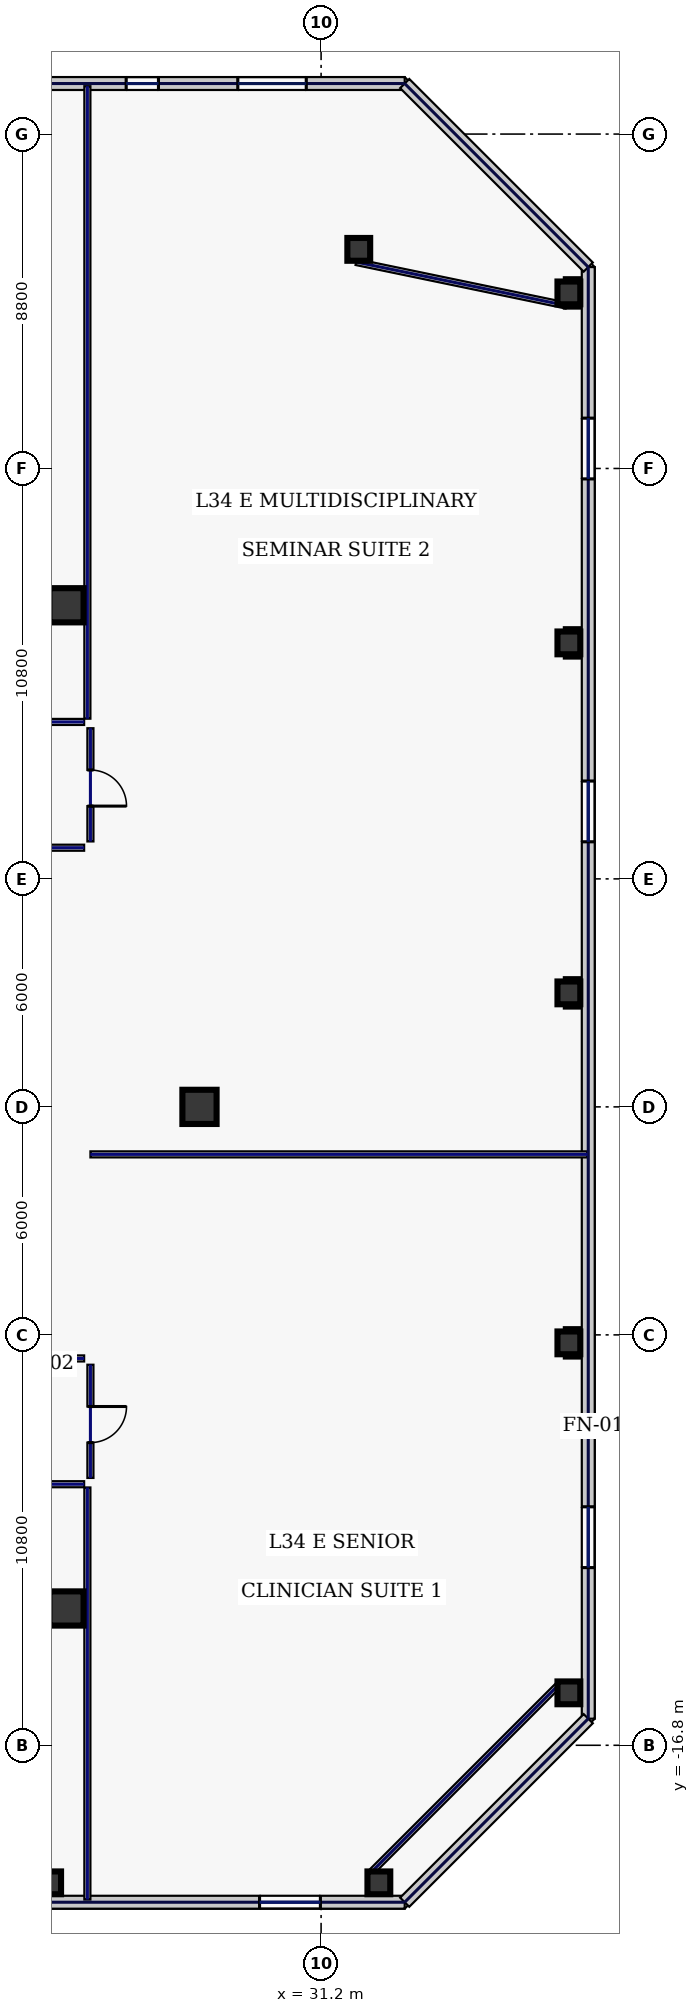
"""IFC4 building model, lengths in metres.
Left out: names, types, materials, properties, quantities, classifications, styles, units other than length and angle.
Written with IfcOpenShell. Run it as: python <this file> out.ifc"""

import sys

from ifc_helpers import new_model, si_unit, direction, frame, frame_2d, origin, origin_2d, place, context, subcontext, project, spatial, rectangle, hollow_rectangle, extrude, element, fill, save


model = new_model("IFC4")
c1 = context("Model", 3, precision=1e-05, world=origin(), true_north=direction((0.0, 1.0)))
c2 = subcontext(c1, "Body", "Model", "MODEL_VIEW")
j1 = project(units=[si_unit("LENGTHUNIT", "METRE"), si_unit("PLANEANGLEUNIT", "RADIAN")], contexts=[c1])
p1 = place(None, origin())
s1 = spatial("IfcSite", under=j1, at=p1, CompositionType="ELEMENT")
p2 = place(p1, origin())
s2 = spatial("IfcBuilding", under=s1, at=p2, CompositionType="ELEMENT")
p3 = place(p2, frame((0.0, 0.0, 152.2)))
s3 = spatial("IfcBuildingStorey", under=s2, at=p3, CompositionType="ELEMENT", Elevation=152.2)
for number, where, z_axis, x_axis in (
    (1, (24.5, -13.2, 0.0), (0.0, 0.0, 1.0), (1.0, 0.0, 0.0)),
    (2, (24.5, 13.2, 0.0), (0.0, 0.0, 1.0), (1.0, 0.0, 0.0)),
    (3, (28.0, 0.0, 0.0), (0.0, 0.0, 1.0), (1.0, 0.0, 0.0)),
):
    element("IfcColumn", number, at=place(p3, frame(where, z_axis=z_axis, x_axis=x_axis)), inside=s3, PredefinedType="COLUMN", context=c2, shape_type="SweptSolid", body=[
        extrude(hollow_rectangle(XDim=0.9, YDim=0.9, WallThickness=0.04, at=origin_2d()), origin(), (0.0, 0.0, 1.0), 3.74),
    ])
for number, where, z_axis, x_axis in (
    (4, (24.057, -20.42, 0.0), (0.0, 0.0, 1.0), (1.0, 0.0, 0.0)),
    (5, (32.72, -20.42, 0.0), (0.0, 0.0, 1.0), (1.0, 0.0, 0.0)),
    (6, (32.191, 22.566, 0.0), (0.0, 0.0, 1.0), (1.0, 0.0, 0.0)),
    (7, (37.72, -15.42, 0.0), (0.0, 0.0, 1.0), (1.0, 0.0, 0.0)),
    (8, (37.72, -6.21, 0.0), (0.0, 0.0, 1.0), (1.0, 0.0, 0.0)),
    (9, (37.72, 3.0, 0.0), (0.0, 0.0, 1.0), (1.0, 0.0, 0.0)),
    (10, (37.72, 12.21, 0.0), (0.0, 0.0, 1.0), (1.0, 0.0, 0.0)),
    (11, (37.72, 21.42, 0.0), (0.0, 0.0, 1.0), (1.0, 0.0, 0.0)),
):
    element("IfcColumn", number, at=place(p3, frame(where, z_axis=z_axis, x_axis=x_axis)), inside=s3, PredefinedType="COLUMN", context=c2, shape_type="SweptSolid", body=[
        extrude(hollow_rectangle(XDim=0.6, YDim=0.6, WallThickness=0.028, at=origin_2d()), origin(), (0.0, 0.0, 1.0), 3.74),
    ])
p4 = place(p3, frame((13.463, -20.93, 0.0), z_axis=(0.0, 0.0, 1.0), x_axis=(1.0, 0.0, 0.0)))
e12 = element("IfcWall", 12, at=p4, inside=s3, PredefinedType="STANDARD", context=c2, shape_type="SweptSolid", body=[
    extrude(rectangle(XDim=19.937, YDim=0.34, at=frame_2d((9.969, 0.0))), origin(), (0.0, 0.0, 1.0), 3.74),
])
p5 = place(p4, frame((3.47, 0.0, 0.22)))
e13 = element("IfcOpeningElement", 13, at=p5, cuts=e12, PredefinedType="OPENING", context=c2, shape_type="SweptSolid", body=[
    extrude(rectangle(XDim=1.6, YDim=1.2, at=frame_2d((0.8, 0.6))), frame((0.0, 0.18, 0.0), z_axis=(0.0, -1.0, 0.0), x_axis=(1.0, 0.0, 0.0)), (0.0, 0.0, 1.0), 0.36),
])
p6 = place(p4, frame((16.118, 0.0, 0.22)))
e14 = element("IfcOpeningElement", 14, at=p6, cuts=e12, PredefinedType="OPENING", context=c2, shape_type="SweptSolid", body=[
    extrude(rectangle(XDim=1.6, YDim=1.2, at=frame_2d((0.8, 0.6))), frame((0.0, 0.18, 0.0), z_axis=(0.0, -1.0, 0.0), x_axis=(1.0, 0.0, 0.0)), (0.0, 0.0, 1.0), 0.36),
])
p7 = place(p3, frame((33.4, 26.93, 0.0), z_axis=(0.0, 0.0, 1.0), x_axis=(-1.0, 0.0, 0.0)))
e15 = element("IfcWall", 15, at=p7, inside=s3, PredefinedType="STANDARD", context=c2, shape_type="SweptSolid", body=[
    extrude(rectangle(XDim=20.09, YDim=0.34, at=frame_2d((10.045, 0.0))), origin(), (0.0, 0.0, 1.0), 3.74),
])
p8 = place(p7, frame((11.071, 0.0, 0.7)))
e16 = element("IfcOpeningElement", 16, at=p8, cuts=e15, PredefinedType="OPENING", context=c2, shape_type="SweptSolid", body=[
    extrude(rectangle(XDim=1.8, YDim=2.2, at=frame_2d((0.9, 1.1))), frame((0.0, 0.18, 0.0), z_axis=(0.0, -1.0, 0.0), x_axis=(1.0, 0.0, 0.0)), (0.0, 0.0, 1.0), 0.36),
])
p9 = place(p7, frame((6.48, 0.0, 0.7)))
e17 = element("IfcOpeningElement", 17, at=p9, cuts=e15, PredefinedType="OPENING", context=c2, shape_type="SweptSolid", body=[
    extrude(rectangle(XDim=0.85, YDim=1.85, at=frame_2d((0.425, 0.925))), frame((0.0, 0.18, 0.0), z_axis=(0.0, -1.0, 0.0), x_axis=(1.0, 0.0, 0.0)), (0.0, 0.0, 1.0), 0.36),
])
p10 = place(p7, frame((2.591, 0.0, 0.7)))
e18 = element("IfcOpeningElement", 18, at=p10, cuts=e15, PredefinedType="OPENING", context=c2, shape_type="SweptSolid", body=[
    extrude(rectangle(XDim=1.8, YDim=2.2, at=frame_2d((0.9, 1.1))), frame((0.0, 0.18, 0.0), z_axis=(0.0, -1.0, 0.0), x_axis=(1.0, 0.0, 0.0)), (0.0, 0.0, 1.0), 0.36),
])
p11 = place(p3, frame((38.23, -16.1, 0.0), z_axis=(0.0, 0.0, 1.0), x_axis=(0.0, 1.0, 0.0)))
e19 = element("IfcWall", 19, at=p11, inside=s3, PredefinedType="STANDARD", context=c2, shape_type="SweptSolid", body=[
    extrude(rectangle(XDim=38.2, YDim=0.34, at=frame_2d((19.1, 0.0))), origin(), (0.0, 0.0, 1.0), 3.74),
])
p12 = place(p11, frame((3.975, 0.0, 0.22)))
e20 = element("IfcOpeningElement", 20, at=p12, cuts=e19, PredefinedType="OPENING", context=c2, shape_type="SweptSolid", body=[
    extrude(rectangle(XDim=1.6, YDim=1.2, at=frame_2d((0.8, 0.6))), frame((0.0, 0.18, 0.0), z_axis=(0.0, -1.0, 0.0), x_axis=(1.0, 0.0, 0.0)), (0.0, 0.0, 1.0), 0.36),
])
p13 = place(p11, frame((23.075, 0.0, 0.22)))
e21 = element("IfcOpeningElement", 21, at=p13, cuts=e19, PredefinedType="OPENING", context=c2, shape_type="SweptSolid", body=[
    extrude(rectangle(XDim=1.6, YDim=1.2, at=frame_2d((0.8, 0.6))), frame((0.0, 0.18, 0.0), z_axis=(0.0, -1.0, 0.0), x_axis=(1.0, 0.0, 0.0)), (0.0, 0.0, 1.0), 0.36),
])
p14 = place(p11, frame((32.625, 0.0, 0.22)))
e22 = element("IfcOpeningElement", 22, at=p14, cuts=e19, PredefinedType="OPENING", context=c2, shape_type="SweptSolid", body=[
    extrude(rectangle(XDim=1.6, YDim=1.2, at=frame_2d((0.8, 0.6))), frame((0.0, 0.18, 0.0), z_axis=(0.0, -1.0, 0.0), x_axis=(1.0, 0.0, 0.0)), (0.0, 0.0, 1.0), 0.36),
])
for number, where, z_axis, x_axis in (
    (23, (33.4, -20.93, 0.0), (0.0, 0.0, 1.0), (0.707, 0.707, 0.0)),
    (24, (38.23, 22.1, 0.0), (0.0, 0.0, 1.0), (-0.707, 0.707, 0.0)),
):
    element("IfcWall", number, at=place(p3, frame(where, z_axis=z_axis, x_axis=x_axis)), inside=s3, PredefinedType="STANDARD", context=c2, shape_type="SweptSolid", body=[
        extrude(rectangle(XDim=6.831, YDim=0.34, at=frame_2d((3.415, 0.0))), origin(), (0.0, 0.0, 1.0), 3.74),
    ])
p15 = place(p3, frame((32.479, -20.18, 0.0), z_axis=(0.0, 0.0, 1.0), x_axis=(0.707106781187, 0.707106781187, 0.0)))
e25 = element("IfcWall", 25, at=p15, inside=s3, PredefinedType="PARTITIONING", context=c2, shape_type="SweptSolid", body=[
    extrude(rectangle(XDim=7.071, YDim=0.16, at=frame_2d((3.536, 0.0))), origin(), (0.0, 0.0, 1.0), 1.535),
])
p16 = place(p3, frame((37.651, 21.087, 0.0), z_axis=(0.0, 0.0, 1.0), x_axis=(-0.979184618318, 0.202971631636, 0.0)))
e26 = element("IfcWall", 26, at=p16, inside=s3, PredefinedType="PARTITIONING", context=c2, shape_type="SweptSolid", body=[
    extrude(rectangle(XDim=5.646, YDim=0.16, at=frame_2d((2.823, 0.0))), origin(), (0.0, 0.0, 1.0), 1.535),
])
p17 = place(p3, frame((-24.965, 10.13, 0.0), z_axis=(0.0, 0.0, 1.0), x_axis=(1.0, 0.0, 0.0)))
e27 = element("IfcWall", 27, at=p17, inside=s3, PredefinedType="PARTITIONING", context=c2, shape_type="SweptSolid", body=[
    extrude(rectangle(XDim=49.93, YDim=0.16, at=frame_2d((24.965, 0.0))), origin(), (0.0, 0.0, 1.0), 3.74),
])
p18 = place(p17, frame((1.869, 0.0, 0.0)))
e28 = element("IfcOpeningElement", 28, at=p18, cuts=e27, PredefinedType="OPENING", context=c2, shape_type="SweptSolid", body=[
    extrude(rectangle(XDim=1.3, YDim=2.2, at=frame_2d((0.65, 1.1))), frame((0.0, 0.09, 0.0), z_axis=(0.0, -1.0, 0.0), x_axis=(1.0, 0.0, 0.0)), (0.0, 0.0, 1.0), 0.18),
])
p19 = place(p17, frame((7.33, 0.0, 0.0)))
e29 = element("IfcOpeningElement", 29, at=p19, cuts=e27, PredefinedType="OPENING", context=c2, shape_type="SweptSolid", body=[
    extrude(rectangle(XDim=0.95, YDim=2.2, at=frame_2d((0.475, 1.1))), frame((0.0, 0.09, 0.0), z_axis=(0.0, -1.0, 0.0), x_axis=(1.0, 0.0, 0.0)), (0.0, 0.0, 1.0), 0.18),
])
p20 = place(p17, frame((12.755, 0.0, 0.0)))
e30 = element("IfcOpeningElement", 30, at=p20, cuts=e27, PredefinedType="OPENING", context=c2, shape_type="SweptSolid", body=[
    extrude(rectangle(XDim=1.3, YDim=2.2, at=frame_2d((0.65, 1.1))), frame((0.0, 0.09, 0.0), z_axis=(0.0, -1.0, 0.0), x_axis=(1.0, 0.0, 0.0)), (0.0, 0.0, 1.0), 0.18),
])
p21 = place(p17, frame((19.225, 0.0, 0.0)))
e31 = element("IfcOpeningElement", 31, at=p21, cuts=e27, PredefinedType="OPENING", context=c2, shape_type="SweptSolid", body=[
    extrude(rectangle(XDim=0.95, YDim=2.2, at=frame_2d((0.475, 1.1))), frame((0.0, 0.09, 0.0), z_axis=(0.0, -1.0, 0.0), x_axis=(1.0, 0.0, 0.0)), (0.0, 0.0, 1.0), 0.18),
])
p22 = place(p17, frame((26.685, 0.0, 0.0)))
e32 = element("IfcOpeningElement", 32, at=p22, cuts=e27, PredefinedType="OPENING", context=c2, shape_type="SweptSolid", body=[
    extrude(rectangle(XDim=1.15, YDim=2.2, at=frame_2d((0.575, 1.1))), frame((0.0, 0.09, 0.0), z_axis=(0.0, -1.0, 0.0), x_axis=(1.0, 0.0, 0.0)), (0.0, 0.0, 1.0), 0.18),
])
p23 = place(p17, frame((33.0, 0.0, 0.0)))
e33 = element("IfcOpeningElement", 33, at=p23, cuts=e27, PredefinedType="OPENING", context=c2, shape_type="SweptSolid", body=[
    extrude(rectangle(XDim=1.05, YDim=2.2, at=frame_2d((0.525, 1.1))), frame((0.0, 0.09, 0.0), z_axis=(0.0, -1.0, 0.0), x_axis=(1.0, 0.0, 0.0)), (0.0, 0.0, 1.0), 0.18),
])
p24 = place(p17, frame((39.225, 0.0, 0.0)))
e34 = element("IfcOpeningElement", 34, at=p24, cuts=e27, PredefinedType="OPENING", context=c2, shape_type="SweptSolid", body=[
    extrude(rectangle(XDim=1.3, YDim=2.2, at=frame_2d((0.65, 1.1))), frame((0.0, 0.09, 0.0), z_axis=(0.0, -1.0, 0.0), x_axis=(1.0, 0.0, 0.0)), (0.0, 0.0, 1.0), 0.18),
])
p25 = place(p17, frame((45.631, 0.0, 0.0)))
e35 = element("IfcOpeningElement", 35, at=p25, cuts=e27, PredefinedType="OPENING", context=c2, shape_type="SweptSolid", body=[
    extrude(rectangle(XDim=1.3, YDim=2.2, at=frame_2d((0.65, 1.1))), frame((0.0, 0.09, 0.0), z_axis=(0.0, -1.0, 0.0), x_axis=(1.0, 0.0, 0.0)), (0.0, 0.0, 1.0), 0.18),
])
p26 = place(p3, frame((25.13, 9.965, 0.0), z_axis=(0.0, 0.0, 1.0), x_axis=(0.0, -1.0, 0.0)))
e36 = element("IfcWall", 36, at=p26, inside=s3, PredefinedType="PARTITIONING", context=c2, shape_type="SweptSolid", body=[
    extrude(rectangle(XDim=2.98, YDim=0.16, at=frame_2d((1.49, 0.0))), origin(), (0.0, 0.0, 1.0), 3.74),
])
p27 = place(p26, frame((1.1, 0.0, 0.0)))
e37 = element("IfcOpeningElement", 37, at=p27, cuts=e36, PredefinedType="OPENING", context=c2, shape_type="SweptSolid", body=[
    extrude(rectangle(XDim=0.95, YDim=2.2, at=frame_2d((0.475, 1.1))), frame((0.0, 0.09, 0.0), z_axis=(0.0, -1.0, 0.0), x_axis=(1.0, 0.0, 0.0)), (0.0, 0.0, 1.0), 0.18),
])
for number, where, z_axis, x_axis in (
    (38, (24.965, 6.82, 0.0), (0.0, 0.0, 1.0), (-1.0, 0.0, 0.0)),
    (39, (10.63, -6.62, 0.0), (0.0, 0.0, 1.0), (1.0, 0.0, 0.0)),
):
    element("IfcWall", number, at=place(p3, frame(where, z_axis=z_axis, x_axis=x_axis)), inside=s3, PredefinedType="PARTITIONING", context=c2, shape_type="SweptSolid", body=[
        extrude(rectangle(XDim=14.335, YDim=0.16, at=frame_2d((7.167, 0.0))), origin(), (0.0, 0.0, 1.0), 3.74),
    ])
p28 = place(p3, frame((25.13, -6.785, 0.0), z_axis=(0.0, 0.0, 1.0), x_axis=(0.0, -1.0, 0.0)))
e40 = element("IfcWall", 40, at=p28, inside=s3, PredefinedType="PARTITIONING", context=c2, shape_type="SweptSolid", body=[
    extrude(rectangle(XDim=2.98, YDim=0.16, at=frame_2d((1.49, 0.0))), origin(), (0.0, 0.0, 1.0), 3.74),
])
p29 = place(p28, frame((1.1, 0.0, 0.0)))
e41 = element("IfcOpeningElement", 41, at=p29, cuts=e40, PredefinedType="OPENING", context=c2, shape_type="SweptSolid", body=[
    extrude(rectangle(XDim=0.95, YDim=2.2, at=frame_2d((0.475, 1.1))), frame((0.0, 0.09, 0.0), z_axis=(0.0, -1.0, 0.0), x_axis=(1.0, 0.0, 0.0)), (0.0, 0.0, 1.0), 0.18),
])
p30 = place(p3, frame((24.965, -9.93, 0.0), z_axis=(0.0, 0.0, 1.0), x_axis=(-1.0, 0.0, 0.0)))
e42 = element("IfcWall", 42, at=p30, inside=s3, PredefinedType="PARTITIONING", context=c2, shape_type="SweptSolid", body=[
    extrude(rectangle(XDim=49.93, YDim=0.16, at=frame_2d((24.965, 0.0))), origin(), (0.0, 0.0, 1.0), 3.74),
])
p31 = place(p30, frame((47.106, 0.0, 0.0)))
e43 = element("IfcOpeningElement", 43, at=p31, cuts=e42, PredefinedType="OPENING", context=c2, shape_type="SweptSolid", body=[
    extrude(rectangle(XDim=0.95, YDim=2.2, at=frame_2d((0.475, 1.1))), frame((0.0, 0.09, 0.0), z_axis=(0.0, -1.0, 0.0), x_axis=(1.0, 0.0, 0.0)), (0.0, 0.0, 1.0), 0.18),
])
p32 = place(p30, frame((40.67, 0.0, 0.0)))
e44 = element("IfcOpeningElement", 44, at=p32, cuts=e42, PredefinedType="OPENING", context=c2, shape_type="SweptSolid", body=[
    extrude(rectangle(XDim=1.45, YDim=2.2, at=frame_2d((0.725, 1.1))), frame((0.0, 0.09, 0.0), z_axis=(0.0, -1.0, 0.0), x_axis=(1.0, 0.0, 0.0)), (0.0, 0.0, 1.0), 0.18),
])
p33 = place(p30, frame((33.23, 0.0, 0.0)))
e45 = element("IfcOpeningElement", 45, at=p33, cuts=e42, PredefinedType="OPENING", context=c2, shape_type="SweptSolid", body=[
    extrude(rectangle(XDim=1.3, YDim=2.2, at=frame_2d((0.65, 1.1))), frame((0.0, 0.09, 0.0), z_axis=(0.0, -1.0, 0.0), x_axis=(1.0, 0.0, 0.0)), (0.0, 0.0, 1.0), 0.18),
])
p34 = place(p30, frame((26.505, 0.0, 0.0)))
e46 = element("IfcOpeningElement", 46, at=p34, cuts=e42, PredefinedType="OPENING", context=c2, shape_type="SweptSolid", body=[
    extrude(rectangle(XDim=1.3, YDim=2.2, at=frame_2d((0.65, 1.1))), frame((0.0, 0.09, 0.0), z_axis=(0.0, -1.0, 0.0), x_axis=(1.0, 0.0, 0.0)), (0.0, 0.0, 1.0), 0.18),
])
p35 = place(p30, frame((21.925, 0.0, 0.0)))
e47 = element("IfcOpeningElement", 47, at=p35, cuts=e42, PredefinedType="OPENING", context=c2, shape_type="SweptSolid", body=[
    extrude(rectangle(XDim=0.95, YDim=2.2, at=frame_2d((0.475, 1.1))), frame((0.0, 0.09, 0.0), z_axis=(0.0, -1.0, 0.0), x_axis=(1.0, 0.0, 0.0)), (0.0, 0.0, 1.0), 0.18),
])
p36 = place(p30, frame((14.637, 0.0, 0.0)))
e48 = element("IfcOpeningElement", 48, at=p36, cuts=e42, PredefinedType="OPENING", context=c2, shape_type="SweptSolid", body=[
    extrude(rectangle(XDim=0.95, YDim=2.2, at=frame_2d((0.475, 1.1))), frame((0.0, 0.09, 0.0), z_axis=(0.0, -1.0, 0.0), x_axis=(1.0, 0.0, 0.0)), (0.0, 0.0, 1.0), 0.18),
])
p37 = place(p30, frame((7.512, 0.0, 0.0)))
e49 = element("IfcOpeningElement", 49, at=p37, cuts=e42, PredefinedType="OPENING", context=c2, shape_type="SweptSolid", body=[
    extrude(rectangle(XDim=0.95, YDim=2.2, at=frame_2d((0.475, 1.1))), frame((0.0, 0.09, 0.0), z_axis=(0.0, -1.0, 0.0), x_axis=(1.0, 0.0, 0.0)), (0.0, 0.0, 1.0), 0.18),
])
p38 = place(p30, frame((2.044, 0.0, 0.0)))
e50 = element("IfcOpeningElement", 50, at=p38, cuts=e42, PredefinedType="OPENING", context=c2, shape_type="SweptSolid", body=[
    extrude(rectangle(XDim=1.05, YDim=2.2, at=frame_2d((0.525, 1.1))), frame((0.0, 0.09, 0.0), z_axis=(0.0, -1.0, 0.0), x_axis=(1.0, 0.0, 0.0)), (0.0, 0.0, 1.0), 0.18),
])
p39 = place(p3, frame((25.05, 10.215, 0.0), z_axis=(0.0, 0.0, 1.0), x_axis=(0.0, 1.0, 0.0)))
e51 = element("IfcWall", 51, at=p39, inside=s3, PredefinedType="PARTITIONING", context=c2, shape_type="SweptSolid", body=[
    extrude(rectangle(XDim=16.645, YDim=0.16, at=frame_2d((8.323, 0.0))), origin(), (0.0, 0.0, 1.0), 3.74),
])
p40 = place(p3, frame((25.05, -20.86, 0.0), z_axis=(0.0, 0.0, 1.0), x_axis=(0.0, 1.0, 0.0)))
e52 = element("IfcWall", 52, at=p40, inside=s3, PredefinedType="PARTITIONING", context=c2, shape_type="SweptSolid", body=[
    extrude(rectangle(XDim=10.845, YDim=0.16, at=frame_2d((5.423, 0.0))), origin(), (0.0, 0.0, 1.0), 3.74),
])
p41 = place(p3, frame((25.13, -1.25, 0.0), z_axis=(0.0, 0.0, 1.0), x_axis=(1.0, 0.0, 0.0)))
e53 = element("IfcWall", 53, at=p41, inside=s3, PredefinedType="PARTITIONING", context=c2, shape_type="SweptSolid", body=[
    extrude(rectangle(XDim=13.08, YDim=0.16, at=frame_2d((6.54, 0.0))), origin(), (0.0, 0.0, 1.0), 3.74),
])
p42 = place(p6, origin())
e54 = element("IfcWindow", 54, at=p42, inside=s3, PartitioningType="SINGLE_PANEL", PredefinedType="WINDOW", context=c2, shape_type="SweptSolid", body=[
    extrude(rectangle(XDim=1.6, YDim=1.2, at=frame_2d((0.8, 0.6))), frame((0.0, 0.03, 0.0), z_axis=(0.0, -1.0, 0.0), x_axis=(1.0, 0.0, 0.0)), (0.0, 0.0, 1.0), 0.06),
])
fill(e14, e54)
p43 = place(p9, origin())
e55 = element("IfcWindow", 55, at=p43, inside=s3, PartitioningType="SINGLE_PANEL", PredefinedType="WINDOW", context=c2, shape_type="SweptSolid", body=[
    extrude(rectangle(XDim=0.85, YDim=1.85, at=frame_2d((0.425, 0.925))), frame((0.0, 0.03, 0.0), z_axis=(0.0, -1.0, 0.0), x_axis=(1.0, 0.0, 0.0)), (0.0, 0.0, 1.0), 0.06),
])
fill(e17, e55)
p44 = place(p10, origin())
e56 = element("IfcWindow", 56, at=p44, inside=s3, PartitioningType="SINGLE_PANEL", PredefinedType="WINDOW", context=c2, shape_type="SweptSolid", body=[
    extrude(rectangle(XDim=1.8, YDim=2.2, at=frame_2d((0.9, 1.1))), frame((0.0, 0.03, 0.0), z_axis=(0.0, -1.0, 0.0), x_axis=(1.0, 0.0, 0.0)), (0.0, 0.0, 1.0), 0.06),
])
fill(e18, e56)
p45 = place(p12, origin())
e57 = element("IfcWindow", 57, at=p45, inside=s3, PartitioningType="SINGLE_PANEL", PredefinedType="WINDOW", context=c2, shape_type="SweptSolid", body=[
    extrude(rectangle(XDim=1.6, YDim=1.2, at=frame_2d((0.8, 0.6))), frame((0.0, 0.03, 0.0), z_axis=(0.0, -1.0, 0.0), x_axis=(1.0, 0.0, 0.0)), (0.0, 0.0, 1.0), 0.06),
])
fill(e20, e57)
p46 = place(p13, origin())
e58 = element("IfcWindow", 58, at=p46, inside=s3, PartitioningType="SINGLE_PANEL", PredefinedType="WINDOW", context=c2, shape_type="SweptSolid", body=[
    extrude(rectangle(XDim=1.6, YDim=1.2, at=frame_2d((0.8, 0.6))), frame((0.0, 0.03, 0.0), z_axis=(0.0, -1.0, 0.0), x_axis=(1.0, 0.0, 0.0)), (0.0, 0.0, 1.0), 0.06),
])
fill(e21, e58)
p47 = place(p14, origin())
e59 = element("IfcWindow", 59, at=p47, inside=s3, PartitioningType="SINGLE_PANEL", PredefinedType="WINDOW", context=c2, shape_type="SweptSolid", body=[
    extrude(rectangle(XDim=1.6, YDim=1.2, at=frame_2d((0.8, 0.6))), frame((0.0, 0.03, 0.0), z_axis=(0.0, -1.0, 0.0), x_axis=(1.0, 0.0, 0.0)), (0.0, 0.0, 1.0), 0.06),
])
fill(e22, e59)
p48 = place(p29, origin())
e60 = element("IfcDoor", 60, at=p48, inside=s3, OperationType="SINGLE_SWING_LEFT", PredefinedType="DOOR", context=c2, shape_type="SweptSolid", body=[
    extrude(rectangle(XDim=0.95, YDim=2.2, at=frame_2d((0.475, 1.1))), frame((0.0, 0.025, 0.0), z_axis=(0.0, -1.0, 0.0), x_axis=(1.0, 0.0, 0.0)), (0.0, 0.0, 1.0), 0.05),
])
fill(e41, e60)
p49 = place(p27, origin())
e61 = element("IfcDoor", 61, at=p49, inside=s3, OperationType="SINGLE_SWING_RIGHT", PredefinedType="DOOR", context=c2, shape_type="SweptSolid", body=[
    extrude(rectangle(XDim=0.95, YDim=2.2, at=frame_2d((0.475, 1.1))), frame((0.0, 0.025, 0.0), z_axis=(0.0, -1.0, 0.0), x_axis=(1.0, 0.0, 0.0)), (0.0, 0.0, 1.0), 0.05),
])
fill(e37, e61)
save(model, sys.argv[1])
